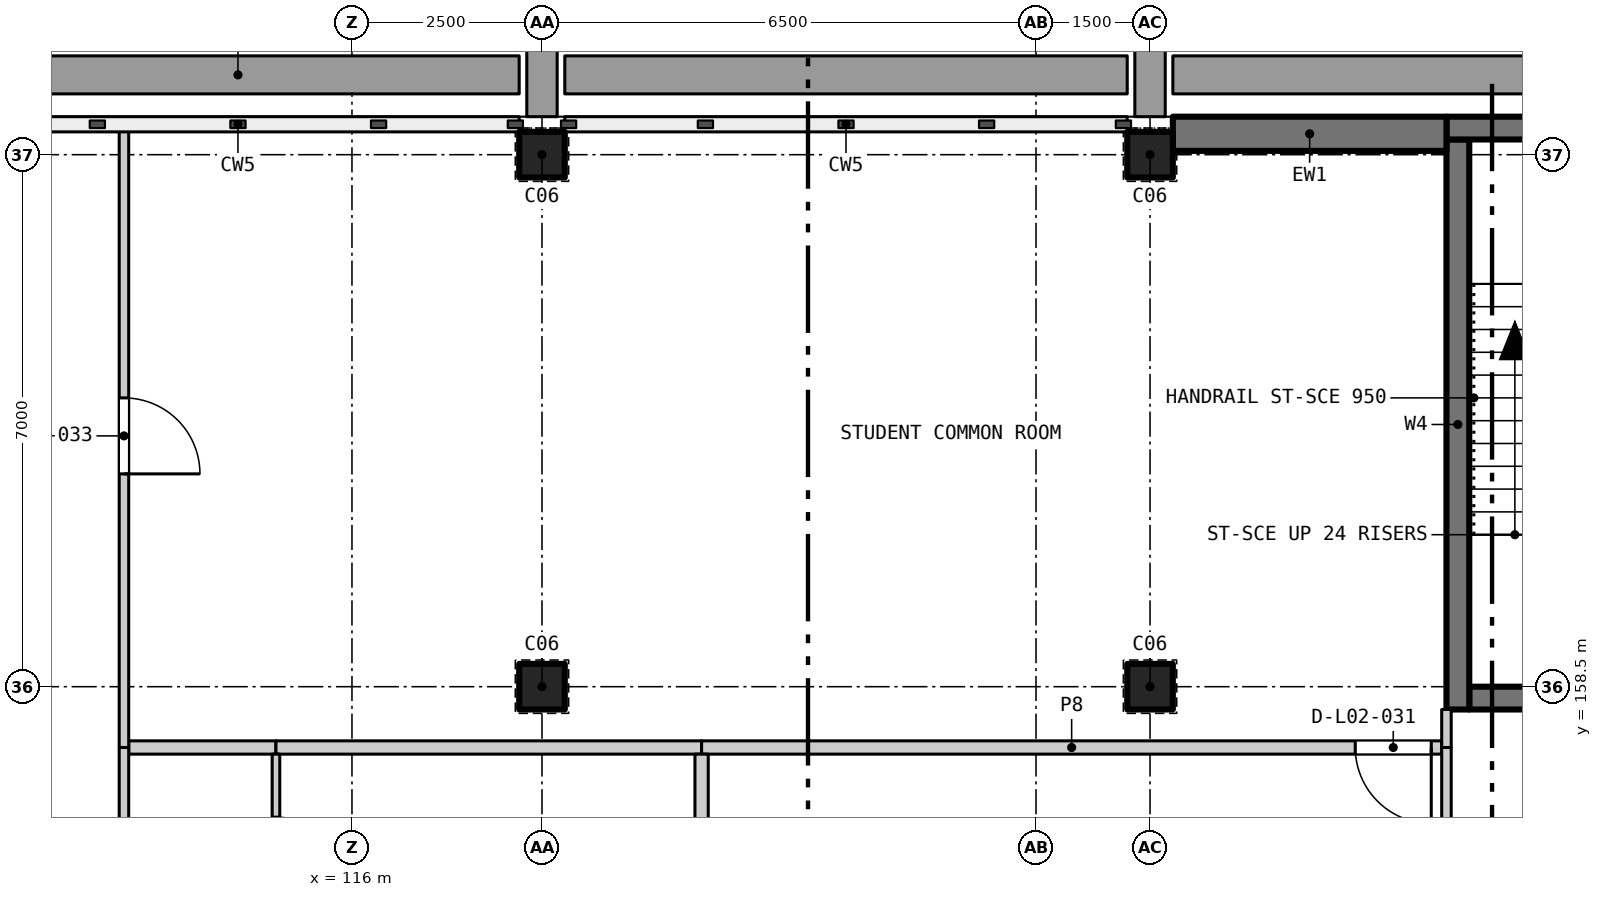
"""IFC4 building model, lengths in metres.
Left out: names, types, materials, properties, quantities, classifications, styles, units other than length and angle.
Written with IfcOpenShell. Run it as: python <this file> out.ifc"""

import sys

from ifc_helpers import new_model, si_unit, direction, frame, frame_2d, origin, origin_2d, place, context, subcontext, project, spatial, rectangle, extrude, element, fill, save


model = new_model("IFC4")
c1 = context("Model", 3, precision=1e-05, world=origin(), true_north=direction((0.0, 1.0)))
c2 = subcontext(c1, "Body", "Model", "MODEL_VIEW")
j1 = project(units=[si_unit("LENGTHUNIT", "METRE"), si_unit("PLANEANGLEUNIT", "RADIAN")], contexts=[c1])
p1 = place(None, origin())
s1 = spatial("IfcSite", under=j1, at=p1, CompositionType="ELEMENT")
p2 = place(p1, origin())
s2 = spatial("IfcBuilding", under=s1, at=p2, CompositionType="ELEMENT")
p3 = place(p2, frame((0.0, 0.0, 10.2)))
s3 = spatial("IfcBuildingStorey", under=s2, at=p3, CompositionType="ELEMENT", Elevation=10.2)
for number, where, z_axis, x_axis in (
    (1, (118.5, 158.5, 0.0), (0.0, 0.0, 1.0), (1.0, 0.0, 0.0)),
    (2, (118.5, 165.5, 0.0), (0.0, 0.0, 1.0), (1.0, 0.0, 0.0)),
    (3, (126.5, 158.5, 0.0), (0.0, 0.0, 1.0), (1.0, 0.0, 0.0)),
    (4, (126.5, 165.5, 0.0), (0.0, 0.0, 1.0), (1.0, 0.0, 0.0)),
):
    element("IfcColumn", number, at=place(p3, frame(where, z_axis=z_axis, x_axis=x_axis)), inside=s3, PredefinedType="COLUMN", context=c2, shape_type="SweptSolid", body=[
        extrude(rectangle(XDim=0.6, YDim=0.6, at=origin_2d()), origin(), (0.0, 0.0, 1.0), 4.2),
    ])
p4 = place(p3, frame((130.7, 158.35, 0.0), z_axis=(0.0, 0.0, 1.0), x_axis=(1.0, 0.0, 0.0)))
e5 = element("IfcWall", 5, at=p4, inside=s3, PredefinedType="SHEAR", context=c2, shape_type="SweptSolid", body=[
    extrude(rectangle(XDim=3.0, YDim=0.3, at=frame_2d((1.5, 0.0))), origin(), (0.0, 0.0, 1.0), 4.2),
])
p5 = place(p4, frame((0.95, 0.0, 0.0)))
e6 = element("IfcOpeningElement", 6, at=p5, cuts=e5, PredefinedType="OPENING", context=c2, shape_type="SweptSolid", body=[
    extrude(rectangle(XDim=1.1, YDim=2.1, at=frame_2d((0.55, 1.05))), frame((0.0, 0.16, 0.0), z_axis=(0.0, -1.0, 0.0), x_axis=(1.0, 0.0, 0.0)), (0.0, 0.0, 1.0), 0.32),
])
p6 = place(p3, frame((130.55, 158.2, 0.0), z_axis=(0.0, 0.0, 1.0), x_axis=(0.0, 1.0, 0.0)))
e7 = element("IfcWall", 7, at=p6, inside=s3, PredefinedType="SHEAR", context=c2, shape_type="SweptSolid", body=[
    extrude(rectangle(XDim=7.5, YDim=0.3, at=frame_2d((3.75, 0.0))), origin(), (0.0, 0.0, 1.0), 4.2),
])
p7 = place(p3, frame((130.4, 165.85, 0.0), z_axis=(0.0, 0.0, 1.0), x_axis=(1.0, 0.0, 0.0)))
e8 = element("IfcWall", 8, at=p7, inside=s3, PredefinedType="SOLIDWALL", context=c2, shape_type="SweptSolid", body=[
    extrude(rectangle(XDim=3.6, YDim=0.3, at=frame_2d((1.8, 0.0))), origin(), (0.0, 0.0, 1.0), 3.9),
])
p8 = place(p3, frame((126.8, 165.775, 0.0), z_axis=(0.0, 0.0, 1.0), x_axis=(1.0, 0.0, 0.0)))
e9 = element("IfcWall", 9, at=p8, inside=s3, PredefinedType="SOLIDWALL", context=c2, shape_type="SweptSolid", body=[
    extrude(rectangle(XDim=3.6, YDim=0.45, at=frame_2d((1.8, 0.0))), origin(), (0.0, 0.0, 1.0), 3.1),
])
p9 = place(p3, frame((113.062, 157.7, 0.0), z_axis=(0.0, 0.0, 1.0), x_axis=(1.0, 0.0, 0.0)))
e10 = element("IfcWall", 10, at=p9, inside=s3, PredefinedType="PARTITIONING", context=c2, shape_type="SweptSolid", body=[
    extrude(rectangle(XDim=1.938, YDim=0.175, at=frame_2d((0.969, 0.0))), origin(), (0.0, 0.0, 1.0), 3.9),
])
p10 = place(p3, frame((115.0, 157.7, 0.0), z_axis=(0.0, 0.0, 1.0), x_axis=(1.0, 0.0, 0.0)))
e11 = element("IfcWall", 11, at=p10, inside=s3, PredefinedType="PARTITIONING", context=c2, shape_type="SweptSolid", body=[
    extrude(rectangle(XDim=5.6, YDim=0.175, at=frame_2d((2.8, 0.0))), origin(), (0.0, 0.0, 1.0), 3.9),
])
p11 = place(p3, frame((120.6, 157.7, 0.0), z_axis=(0.0, 0.0, 1.0), x_axis=(1.0, 0.0, 0.0)))
e12 = element("IfcWall", 12, at=p11, inside=s3, PredefinedType="PARTITIONING", context=c2, shape_type="SweptSolid", body=[
    extrude(rectangle(XDim=9.737, YDim=0.175, at=frame_2d((4.869, 0.0))), origin(), (0.0, 0.0, 1.0), 3.9),
])
p12 = place(p11, frame((8.6, 0.0, 0.0)))
e13 = element("IfcOpeningElement", 13, at=p12, cuts=e12, PredefinedType="OPENING", context=c2, shape_type="SweptSolid", body=[
    extrude(rectangle(XDim=1.0, YDim=2.1, at=frame_2d((0.5, 1.05))), frame((0.0, 0.097, 0.0), z_axis=(0.0, -1.0, 0.0), x_axis=(1.0, 0.0, 0.0)), (0.0, 0.0, 1.0), 0.195),
])
p13 = place(p3, frame((113.0, 149.41, 0.0), z_axis=(0.0, 0.0, 1.0), x_axis=(0.0, 1.0, 0.0)))
e14 = element("IfcWall", 14, at=p13, inside=s3, PredefinedType="PARTITIONING", context=c2, shape_type="SweptSolid", body=[
    extrude(rectangle(XDim=8.29, YDim=0.125, at=frame_2d((4.145, 0.0))), origin(), (0.0, 0.0, 1.0), 3.9),
])
p14 = place(p3, frame((113.0, 157.7, 0.0), z_axis=(0.0, 0.0, 1.0), x_axis=(0.0, 1.0, 0.0)))
e15 = element("IfcWall", 15, at=p14, inside=s3, PredefinedType="PARTITIONING", context=c2, shape_type="SweptSolid", body=[
    extrude(rectangle(XDim=8.15, YDim=0.125, at=frame_2d((4.075, 0.0))), origin(), (0.0, 0.0, 1.0), 3.9),
])
p15 = place(p14, frame((3.6, 0.0, 0.0)))
e16 = element("IfcOpeningElement", 16, at=p15, cuts=e15, PredefinedType="OPENING", context=c2, shape_type="SweptSolid", body=[
    extrude(rectangle(XDim=1.0, YDim=2.1, at=frame_2d((0.5, 1.05))), frame((0.0, 0.073, 0.0), z_axis=(0.0, -1.0, 0.0), x_axis=(1.0, 0.0, 0.0)), (0.0, 0.0, 1.0), 0.145),
])
p16 = place(p3, frame((115.0, 154.933, 0.0), z_axis=(0.0, 0.0, 1.0), x_axis=(0.0, 1.0, 0.0)))
e17 = element("IfcWall", 17, at=p16, inside=s3, PredefinedType="PARTITIONING", context=c2, shape_type="SweptSolid", body=[
    extrude(rectangle(XDim=2.679, YDim=0.1, at=frame_2d((1.34, 0.0))), origin(), (0.0, 0.0, 1.0), 3.9),
])
p17 = place(p16, frame((0.85, 0.0, 0.0)))
e18 = element("IfcOpeningElement", 18, at=p17, cuts=e17, PredefinedType="OPENING", context=c2, shape_type="SweptSolid", body=[
    extrude(rectangle(XDim=1.0, YDim=2.1, at=frame_2d((0.5, 1.05))), frame((0.0, 0.06, 0.0), z_axis=(0.0, -1.0, 0.0), x_axis=(1.0, 0.0, 0.0)), (0.0, 0.0, 1.0), 0.12),
])
p18 = place(p3, frame((120.6, 154.933, 0.0), z_axis=(0.0, 0.0, 1.0), x_axis=(0.0, 1.0, 0.0)))
e19 = element("IfcWall", 19, at=p18, inside=s3, PredefinedType="PARTITIONING", context=c2, shape_type="SweptSolid", body=[
    extrude(rectangle(XDim=2.679, YDim=0.175, at=frame_2d((1.34, 0.0))), origin(), (0.0, 0.0, 1.0), 3.9),
])
p19 = place(p3, frame((130.4, 149.41, 0.0), z_axis=(0.0, 0.0, 1.0), x_axis=(0.0, 1.0, 0.0)))
e20 = element("IfcWall", 20, at=p19, inside=s3, PredefinedType="PARTITIONING", context=c2, shape_type="SweptSolid", body=[
    extrude(rectangle(XDim=8.29, YDim=0.125, at=frame_2d((4.145, 0.0))), origin(), (0.0, 0.0, 1.0), 3.9),
])
p20 = place(p3, frame((130.4, 157.7, 0.0), z_axis=(0.0, 0.0, 1.0), x_axis=(0.0, 1.0, 0.0)))
e21 = element("IfcWall", 21, at=p20, inside=s3, PredefinedType="PARTITIONING", context=c2, shape_type="SweptSolid", body=[
    extrude(rectangle(XDim=0.5, YDim=0.125, at=frame_2d((0.25, 0.0))), origin(), (0.0, 0.0, 1.0), 3.9),
])
p21 = place(p12, frame((1.0, 0.0, 0.0), z_axis=(0.0, 0.0, 1.0), x_axis=(-1.0, 0.0, 0.0)))
e22 = element("IfcDoor", 22, at=p21, inside=s3, OperationType="SINGLE_SWING_LEFT", PredefinedType="DOOR", context=c2, shape_type="SweptSolid", body=[
    extrude(rectangle(XDim=1.0, YDim=2.1, at=frame_2d((0.5, 1.05))), frame((0.0, 0.025, 0.0), z_axis=(0.0, -1.0, 0.0), x_axis=(1.0, 0.0, 0.0)), (0.0, 0.0, 1.0), 0.05),
])
fill(e13, e22)
p22 = place(p15, frame((1.0, 0.0, 0.0), z_axis=(0.0, 0.0, 1.0), x_axis=(-1.0, 0.0, 0.0)))
e23 = element("IfcDoor", 23, at=p22, inside=s3, OperationType="SINGLE_SWING_RIGHT", PredefinedType="DOOR", context=c2, shape_type="SweptSolid", body=[
    extrude(rectangle(XDim=1.0, YDim=2.1, at=frame_2d((0.5, 1.05))), frame((0.0, 0.025, 0.0), z_axis=(0.0, -1.0, 0.0), x_axis=(1.0, 0.0, 0.0)), (0.0, 0.0, 1.0), 0.05),
])
fill(e16, e23)
save(model, sys.argv[1])
